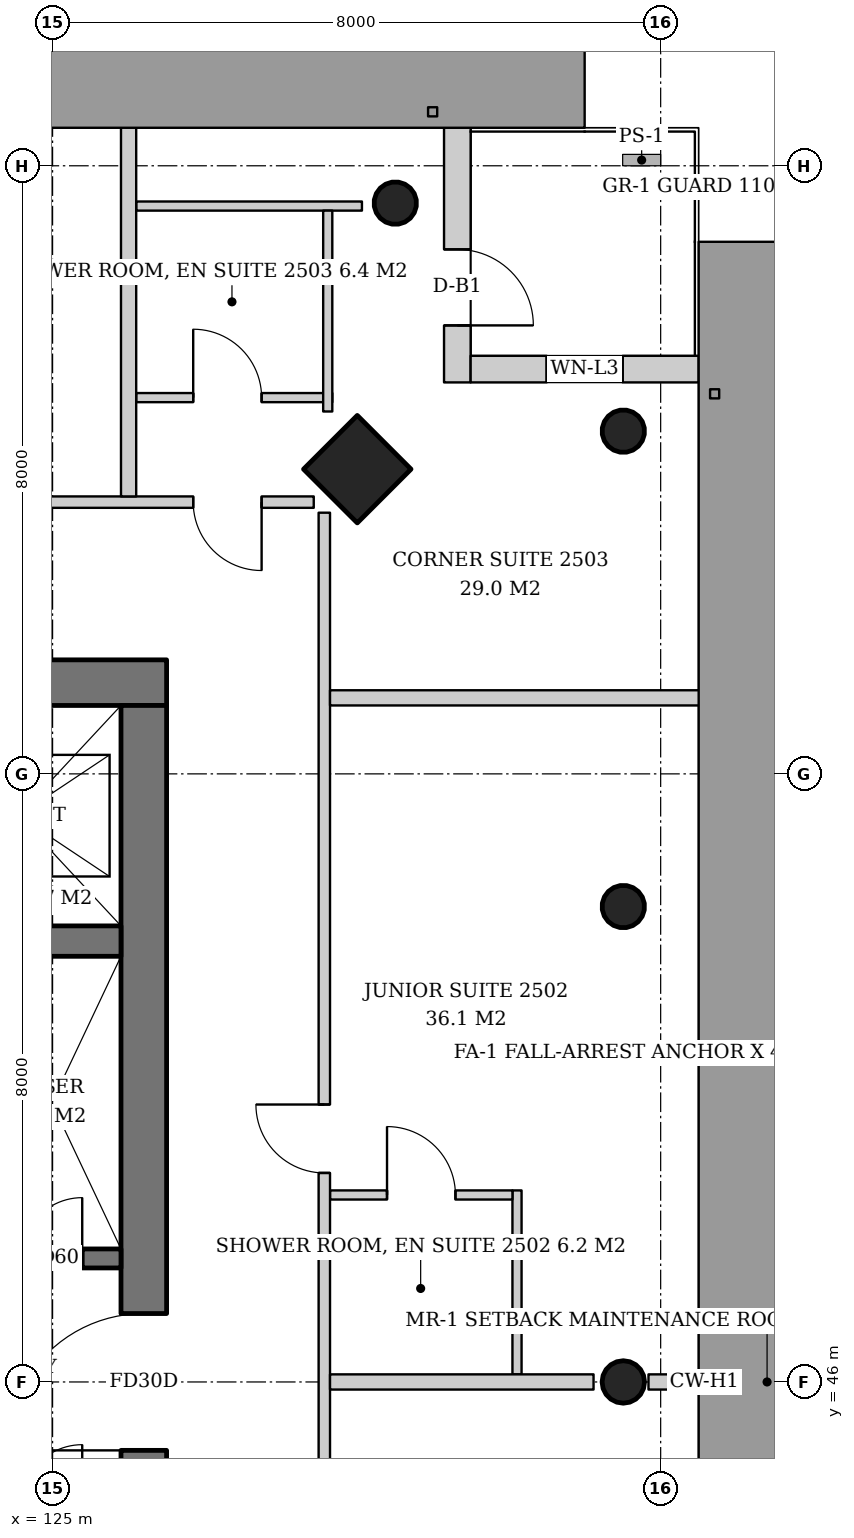
"""IFC4 building model, lengths in metres.
Left out: names, types, materials, properties, quantities, classifications, styles, units other than length and angle.
Written with IfcOpenShell. Run it as: python <this file> out.ifc"""

import sys

from ifc_helpers import new_model, si_unit, direction, frame, frame_2d, origin, origin_2d, place, context, subcontext, project, spatial, rectangle, hollow_circle, extrude, element, fill, save


model = new_model("IFC4")
c1 = context("Model", 3, precision=1e-05, world=origin(), true_north=direction((0.0, 1.0)))
c2 = subcontext(c1, "Body", "Model", "MODEL_VIEW")
j1 = project(units=[si_unit("LENGTHUNIT", "METRE"), si_unit("PLANEANGLEUNIT", "RADIAN")], contexts=[c1])
p1 = place(None, origin())
s1 = spatial("IfcSite", under=j1, at=p1, CompositionType="ELEMENT")
p2 = place(p1, origin())
s2 = spatial("IfcBuilding", under=s1, at=p2, CompositionType="ELEMENT")
p3 = place(p2, frame((0.0, 0.0, 100.8)))
s3 = spatial("IfcBuildingStorey", under=s2, at=p3, CompositionType="ELEMENT", Elevation=100.8)
p4 = place(p3, frame((129.06, 58.06, 0.0), z_axis=(-0.043029647111, -0.043029647111, 0.998146732169), x_axis=(0.707106781187, -0.707106781187, 0.0)))
e1 = element("IfcColumn", 1, at=p4, inside=s3, PredefinedType="COLUMN", context=c2, shape_type="SweptSolid", body=[
    extrude(rectangle(XDim=1.0, YDim=1.0, at=origin_2d()), origin(), (0.0, 0.0, 1.0), 3.807),
])
p5 = place(p3, frame((132.56, 58.56, 0.0), z_axis=(-0.043029647111, -0.043029647111, 0.998146732169), x_axis=(0.707106781187, -0.707106781187, 0.0)))
e2 = element("IfcColumn", 2, at=p5, inside=s3, PredefinedType="COLUMN", context=c2, shape_type="SweptSolid", body=[
    extrude(hollow_circle(Radius=0.28, WallThickness=0.02, at=origin_2d()), origin(), (0.0, 0.0, 1.0), 3.807),
])
p6 = place(p3, frame((132.56, 46.0, 0.0), z_axis=(-0.043069538298, 0.0, 0.999072076915), x_axis=(0.0, -1.0, 0.0)))
e3 = element("IfcColumn", 3, at=p6, inside=s3, PredefinedType="COLUMN", context=c2, shape_type="SweptSolid", body=[
    extrude(hollow_circle(Radius=0.28, WallThickness=0.02, at=origin_2d()), origin(), (0.0, 0.0, 1.0), 3.803),
])
p7 = place(p3, frame((132.56, 52.28, 0.0), z_axis=(-0.043059525333, -0.021561848751, 0.998839808957), x_axis=(0.44774654769, -0.894160516368, 0.0)))
e4 = element("IfcColumn", 4, at=p7, inside=s3, PredefinedType="COLUMN", context=c2, shape_type="SweptSolid", body=[
    extrude(hollow_circle(Radius=0.28, WallThickness=0.02, at=origin_2d()), origin(), (0.0, 0.0, 1.0), 3.804),
])
p8 = place(p3, frame((129.56, 61.56, 0.0), z_axis=(-0.043029647111, -0.043029647111, 0.998146732169), x_axis=(0.707106781187, -0.707106781187, 0.0)))
e5 = element("IfcColumn", 5, at=p8, inside=s3, PredefinedType="COLUMN", context=c2, shape_type="SweptSolid", body=[
    extrude(hollow_circle(Radius=0.28, WallThickness=0.02, at=origin_2d()), origin(), (0.0, 0.0, 1.0), 3.807),
])
p9 = place(p3, frame((107.5, 55.2, 0.0), z_axis=(0.0, 0.0, 1.0), x_axis=(1.0, 0.0, 0.0)))
e6 = element("IfcWall", 6, at=p9, inside=s3, PredefinedType="SHEAR", context=c2, shape_type="SweptSolid", body=[
    extrude(rectangle(XDim=19.0, YDim=0.6, at=frame_2d((9.5, 0.0))), origin(), (0.0, 0.0, 1.0), 3.8),
])
p10 = place(p9, frame((14.14, 0.0, 0.0)))
e7 = element("IfcOpeningElement", 7, at=p10, cuts=e6, PredefinedType="OPENING", context=c2, shape_type="SweptSolid", body=[
    extrude(rectangle(XDim=1.0, YDim=2.1, at=frame_2d((0.5, 1.05))), frame((0.0, 0.31, 0.0), z_axis=(0.0, -1.0, 0.0), x_axis=(1.0, 0.0, 0.0)), (0.0, 0.0, 1.0), 0.62),
])
p11 = place(p9, frame((1.675, 0.0, 0.0)))
e8 = element("IfcOpeningElement", 8, at=p11, cuts=e6, PredefinedType="OPENING", context=c2, shape_type="SweptSolid", body=[
    extrude(rectangle(XDim=1.0, YDim=2.1, at=frame_2d((0.5, 1.05))), frame((0.0, 0.31, 0.0), z_axis=(0.0, -1.0, 0.0), x_axis=(1.0, 0.0, 0.0)), (0.0, 0.0, 1.0), 0.62),
])
p12 = place(p9, frame((3.587, 0.0, 0.0)))
e9 = element("IfcOpeningElement", 9, at=p12, cuts=e6, PredefinedType="OPENING", context=c2, shape_type="SweptSolid", body=[
    extrude(rectangle(XDim=1.0, YDim=2.1, at=frame_2d((0.5, 1.05))), frame((0.0, 0.31, 0.0), z_axis=(0.0, -1.0, 0.0), x_axis=(1.0, 0.0, 0.0)), (0.0, 0.0, 1.0), 0.62),
])
p13 = place(p3, frame((126.2, 37.1, 0.0), z_axis=(0.0, 0.0, 1.0), x_axis=(0.0, 1.0, 0.0)))
e10 = element("IfcWall", 10, at=p13, inside=s3, PredefinedType="SHEAR", context=c2, shape_type="SweptSolid", body=[
    extrude(rectangle(XDim=17.8, YDim=0.6, at=frame_2d((8.9, 0.0))), origin(), (0.0, 0.0, 1.0), 3.8),
])
p14 = place(p13, frame((8.0, 0.0, 0.0)))
e11 = element("IfcOpeningElement", 11, at=p14, cuts=e10, PredefinedType="OPENING", context=c2, shape_type="SweptSolid", body=[
    extrude(rectangle(XDim=1.8, YDim=2.4, at=frame_2d((0.9, 1.2))), frame((0.0, 0.31, 0.0), z_axis=(0.0, -1.0, 0.0), x_axis=(1.0, 0.0, 0.0)), (0.0, 0.0, 1.0), 0.62),
])
p15 = place(p3, frame((108.1, 51.8, 0.0), z_axis=(0.0, 0.0, 1.0), x_axis=(1.0, 0.0, 0.0)))
e12 = element("IfcWall", 12, at=p15, inside=s3, PredefinedType="SHEAR", context=c2, shape_type="SweptSolid", body=[
    extrude(rectangle(XDim=17.8, YDim=0.4, at=frame_2d((8.9, 0.0))), origin(), (0.0, 0.0, 1.0), 3.8),
])
p16 = place(p3, frame((130.325, 62.5, 0.0), z_axis=(0.0, 0.0, 1.0), x_axis=(0.0, -1.0, 0.0)))
e13 = element("IfcWall", 13, at=p16, inside=s3, PredefinedType="SOLIDWALL", context=c2, shape_type="SweptSolid", body=[
    extrude(rectangle(XDim=3.35, YDim=0.35, at=frame_2d((1.675, 0.0))), origin(), (0.0, 0.0, 1.0), 3.6),
])
p17 = place(p16, frame((1.6, 0.0, 0.0)))
e14 = element("IfcOpeningElement", 14, at=p17, cuts=e13, PredefinedType="OPENING", context=c2, shape_type="SweptSolid", body=[
    extrude(rectangle(XDim=1.0, YDim=2.4, at=frame_2d((0.5, 1.2))), frame((0.0, 0.185, 0.0), z_axis=(0.0, -1.0, 0.0), x_axis=(1.0, 0.0, 0.0)), (0.0, 0.0, 1.0), 0.37),
])
p18 = place(p3, frame((130.5, 59.325, 0.0), z_axis=(0.0, 0.0, 1.0), x_axis=(1.0, 0.0, 0.0)))
e15 = element("IfcWall", 15, at=p18, inside=s3, PredefinedType="SOLIDWALL", context=c2, shape_type="SweptSolid", body=[
    extrude(rectangle(XDim=3.0, YDim=0.35, at=frame_2d((1.5, 0.0))), origin(), (0.0, 0.0, 1.0), 3.6),
])
p19 = place(p18, frame((1.0, 0.0, 0.9)))
e16 = element("IfcOpeningElement", 16, at=p19, cuts=e15, PredefinedType="OPENING", context=c2, shape_type="SweptSolid", body=[
    extrude(rectangle(XDim=1.0, YDim=2.4, at=frame_2d((0.5, 1.2))), frame((0.0, 0.185, 0.0), z_axis=(0.0, -1.0, 0.0), x_axis=(1.0, 0.0, 0.0)), (0.0, 0.0, 1.0), 0.37),
])
p20 = place(p3, frame((121.33, 47.625, 0.0), z_axis=(0.0, 0.0, 1.0), x_axis=(1.0, 0.0, 0.0)))
e17 = element("IfcWall", 17, at=p20, inside=s3, PredefinedType="SHEAR", context=c2, shape_type="SweptSolid", body=[
    extrude(rectangle(XDim=4.57, YDim=0.25, at=frame_2d((2.285, 0.0))), origin(), (0.0, 0.0, 1.0), 3.8),
])
p21 = place(p20, frame((0.55, 0.0, 0.0)))
e18 = element("IfcOpeningElement", 18, at=p21, cuts=e17, PredefinedType="OPENING", context=c2, shape_type="SweptSolid", body=[
    extrude(rectangle(XDim=1.4, YDim=2.4, at=frame_2d((0.7, 1.2))), frame((0.0, 0.135, 0.0), z_axis=(0.0, -1.0, 0.0), x_axis=(1.0, 0.0, 0.0)), (0.0, 0.0, 1.0), 0.27),
])
p22 = place(p20, frame((3.26, 0.0, 0.0)))
e19 = element("IfcOpeningElement", 19, at=p22, cuts=e17, PredefinedType="OPENING", context=c2, shape_type="SweptSolid", body=[
    extrude(rectangle(XDim=0.8, YDim=2.0, at=frame_2d((0.4, 1.0))), frame((0.0, 0.135, 0.0), z_axis=(0.0, -1.0, 0.0), x_axis=(1.0, 0.0, 0.0)), (0.0, 0.0, 1.0), 0.27),
])
p23 = place(p3, frame((131.11, 46.1, 0.0), z_axis=(0.0, 0.0, 1.0), x_axis=(0.0, 1.0, 0.0)))
e20 = element("IfcWall", 20, at=p23, inside=s3, PredefinedType="PARTITIONING", context=c2, shape_type="SweptSolid", body=[
    extrude(rectangle(XDim=2.42, YDim=0.12, at=frame_2d((1.21, 0.0))), origin(), (0.0, 0.0, 1.0), 3.6),
])
p24 = place(p3, frame((128.65, 48.46, 0.0), z_axis=(0.0, 0.0, 1.0), x_axis=(1.0, 0.0, 0.0)))
e21 = element("IfcWall", 21, at=p24, inside=s3, PredefinedType="PARTITIONING", context=c2, shape_type="SweptSolid", body=[
    extrude(rectangle(XDim=2.4, YDim=0.12, at=frame_2d((1.2, 0.0))), origin(), (0.0, 0.0, 1.0), 3.6),
])
p25 = place(p24, frame((0.75, 0.0, 0.0)))
e22 = element("IfcOpeningElement", 22, at=p25, cuts=e21, PredefinedType="OPENING", context=c2, shape_type="SweptSolid", body=[
    extrude(rectangle(XDim=0.9, YDim=2.1, at=frame_2d((0.45, 1.05))), frame((0.0, 0.07, 0.0), z_axis=(0.0, -1.0, 0.0), x_axis=(1.0, 0.0, 0.0)), (0.0, 0.0, 1.0), 0.14),
])
p26 = place(p3, frame((128.575, 34.564, 0.0), z_axis=(0.0, 0.0, 1.0), x_axis=(0.0, 1.0, 0.0)))
e23 = element("IfcWall", 23, at=p26, inside=s3, PredefinedType="PARTITIONING", context=c2, shape_type="SweptSolid", body=[
    extrude(rectangle(XDim=22.872, YDim=0.15, at=frame_2d((11.436, 0.0))), origin(), (0.0, 0.0, 1.0), 2.9),
])
p27 = place(p26, frame((0.636, 0.0, 0.0)))
e24 = element("IfcOpeningElement", 24, at=p27, cuts=e23, PredefinedType="OPENING", context=c2, shape_type="SweptSolid", body=[
    extrude(rectangle(XDim=1.0, YDim=2.1, at=frame_2d((0.5, 1.05))), frame((0.0, 0.085, 0.0), z_axis=(0.0, -1.0, 0.0), x_axis=(1.0, 0.0, 0.0)), (0.0, 0.0, 1.0), 0.17),
])
p28 = place(p26, frame((5.186, 0.0, 0.0)))
e25 = element("IfcOpeningElement", 25, at=p28, cuts=e23, PredefinedType="OPENING", context=c2, shape_type="SweptSolid", body=[
    extrude(rectangle(XDim=0.9, YDim=2.1, at=frame_2d((0.45, 1.05))), frame((0.0, 0.085, 0.0), z_axis=(0.0, -1.0, 0.0), x_axis=(1.0, 0.0, 0.0)), (0.0, 0.0, 1.0), 0.17),
])
p29 = place(p26, frame((14.186, 0.0, 0.0)))
e26 = element("IfcOpeningElement", 26, at=p29, cuts=e23, PredefinedType="OPENING", context=c2, shape_type="SweptSolid", body=[
    extrude(rectangle(XDim=0.9, YDim=2.1, at=frame_2d((0.45, 1.05))), frame((0.0, 0.085, 0.0), z_axis=(0.0, -1.0, 0.0), x_axis=(1.0, 0.0, 0.0)), (0.0, 0.0, 1.0), 0.17),
])
p30 = place(p3, frame((128.65, 46.0, 0.0), z_axis=(0.0, 0.0, 1.0), x_axis=(1.0, 0.0, 0.0)))
e27 = element("IfcWall", 27, at=p30, inside=s3, PredefinedType="PARTITIONING", context=c2, shape_type="SweptSolid", body=[
    extrude(rectangle(XDim=3.467, YDim=0.2, at=frame_2d((1.733, 0.0))), origin(), (0.0, 0.0, 1.0), 3.6),
])
p31 = place(p3, frame((132.84, 46.0, 0.0), z_axis=(0.0, 0.0, 1.0), x_axis=(1.0, 0.0, 0.0)))
e28 = element("IfcWall", 28, at=p31, inside=s3, PredefinedType="PARTITIONING", context=c2, shape_type="SweptSolid", body=[
    extrude(rectangle(XDim=0.7, YDim=0.2, at=frame_2d((0.35, 0.0))), origin(), (0.0, 0.0, 1.0), 3.6),
])
p32 = place(p3, frame((128.65, 55.0, 0.0), z_axis=(0.0, 0.0, 1.0), x_axis=(1.0, 0.0, 0.0)))
e29 = element("IfcWall", 29, at=p32, inside=s3, PredefinedType="PARTITIONING", context=c2, shape_type="SweptSolid", body=[
    extrude(rectangle(XDim=4.89, YDim=0.2, at=frame_2d((2.445, 0.0))), origin(), (0.0, 0.0, 1.0), 3.2),
])
p33 = place(p3, frame((126.1, 58.95, 0.0), z_axis=(0.0, 0.0, 1.0), x_axis=(1.0, 0.0, 0.0)))
e30 = element("IfcWall", 30, at=p33, inside=s3, PredefinedType="PARTITIONING", context=c2, shape_type="SweptSolid", body=[
    extrude(rectangle(XDim=2.58, YDim=0.12, at=frame_2d((1.29, 0.0))), origin(), (0.0, 0.0, 1.0), 2.9),
])
p34 = place(p33, frame((0.75, 0.0, 0.0)))
e31 = element("IfcOpeningElement", 31, at=p34, cuts=e30, PredefinedType="OPENING", context=c2, shape_type="SweptSolid", body=[
    extrude(rectangle(XDim=0.9, YDim=2.1, at=frame_2d((0.45, 1.05))), frame((0.0, 0.07, 0.0), z_axis=(0.0, -1.0, 0.0), x_axis=(1.0, 0.0, 0.0)), (0.0, 0.0, 1.0), 0.14),
])
p35 = place(p3, frame((126.1, 61.47, 0.0), z_axis=(0.0, 0.0, 1.0), x_axis=(1.0, 0.0, 0.0)))
e32 = element("IfcWall", 32, at=p35, inside=s3, PredefinedType="PARTITIONING", context=c2, shape_type="SweptSolid", body=[
    extrude(rectangle(XDim=2.97, YDim=0.12, at=frame_2d((1.485, 0.0))), origin(), (0.0, 0.0, 1.0), 3.2),
])
p36 = place(p3, frame((128.62, 58.767, 0.0), z_axis=(0.0, 0.0, 1.0), x_axis=(0.0, 1.0, 0.0)))
e33 = element("IfcWall", 33, at=p36, inside=s3, PredefinedType="PARTITIONING", context=c2, shape_type="SweptSolid", body=[
    extrude(rectangle(XDim=2.643, YDim=0.12, at=frame_2d((1.321, 0.0))), origin(), (0.0, 0.0, 1.0), 3.2),
])
p37 = place(p3, frame((128.436, 57.575, 0.0), z_axis=(0.0, 0.0, 1.0), x_axis=(-1.0, 0.0, 0.0)))
e34 = element("IfcWall", 34, at=p37, inside=s3, PredefinedType="PARTITIONING", context=c2, shape_type="SweptSolid", body=[
    extrude(rectangle(XDim=22.872, YDim=0.15, at=frame_2d((11.436, 0.0))), origin(), (0.0, 0.0, 1.0), 2.9),
])
p38 = place(p37, frame((0.686, 0.0, 0.0)))
e35 = element("IfcOpeningElement", 35, at=p38, cuts=e34, PredefinedType="OPENING", context=c2, shape_type="SweptSolid", body=[
    extrude(rectangle(XDim=0.9, YDim=2.1, at=frame_2d((0.45, 1.05))), frame((0.0, 0.085, 0.0), z_axis=(0.0, -1.0, 0.0), x_axis=(1.0, 0.0, 0.0)), (0.0, 0.0, 1.0), 0.17),
])
p39 = place(p37, frame((5.136, 0.0, 0.0)))
e36 = element("IfcOpeningElement", 36, at=p39, cuts=e34, PredefinedType="OPENING", context=c2, shape_type="SweptSolid", body=[
    extrude(rectangle(XDim=1.0, YDim=2.1, at=frame_2d((0.5, 1.05))), frame((0.0, 0.085, 0.0), z_axis=(0.0, -1.0, 0.0), x_axis=(1.0, 0.0, 0.0)), (0.0, 0.0, 1.0), 0.17),
])
p40 = place(p37, frame((14.186, 0.0, 0.0)))
e37 = element("IfcOpeningElement", 37, at=p40, cuts=e34, PredefinedType="OPENING", context=c2, shape_type="SweptSolid", body=[
    extrude(rectangle(XDim=0.9, YDim=2.1, at=frame_2d((0.45, 1.05))), frame((0.0, 0.085, 0.0), z_axis=(0.0, -1.0, 0.0), x_axis=(1.0, 0.0, 0.0)), (0.0, 0.0, 1.0), 0.17),
])
p41 = place(p3, frame((126.0, 57.65, 0.0), z_axis=(0.0, 0.0, 1.0), x_axis=(0.0, 1.0, 0.0)))
e38 = element("IfcWall", 38, at=p41, inside=s3, PredefinedType="PARTITIONING", context=c2, shape_type="SweptSolid", body=[
    extrude(rectangle(XDim=4.89, YDim=0.2, at=frame_2d((2.445, 0.0))), origin(), (0.0, 0.0, 1.0), 2.9),
])
p42 = place(p17, origin())
e39 = element("IfcDoor", 39, at=p42, inside=s3, OperationType="SINGLE_SWING_RIGHT", PredefinedType="DOOR", context=c2, shape_type="SweptSolid", body=[
    extrude(rectangle(XDim=1.0, YDim=2.4, at=frame_2d((0.5, 1.2))), frame((0.0, 0.025, 0.0), z_axis=(0.0, -1.0, 0.0), x_axis=(1.0, 0.0, 0.0)), (0.0, 0.0, 1.0), 0.05),
])
fill(e14, e39)
p43 = place(p19, origin())
e40 = element("IfcWindow", 40, at=p43, inside=s3, PartitioningType="SINGLE_PANEL", PredefinedType="WINDOW", context=c2, shape_type="SweptSolid", body=[
    extrude(rectangle(XDim=1.0, YDim=2.4, at=frame_2d((0.5, 1.2))), frame((0.0, 0.03, 0.0), z_axis=(0.0, -1.0, 0.0), x_axis=(1.0, 0.0, 0.0)), (0.0, 0.0, 1.0), 0.06),
])
fill(e16, e40)
p44 = place(p22, origin())
e41 = element("IfcDoor", 41, at=p44, inside=s3, OperationType="SINGLE_SWING_RIGHT", PredefinedType="DOOR", context=c2, shape_type="SweptSolid", body=[
    extrude(rectangle(XDim=0.8, YDim=2.0, at=frame_2d((0.4, 1.0))), frame((0.0, 0.025, 0.0), z_axis=(0.0, -1.0, 0.0), x_axis=(1.0, 0.0, 0.0)), (0.0, 0.0, 1.0), 0.05),
])
fill(e19, e41)
p45 = place(p14, origin())
e42 = element("IfcDoor", 42, at=p45, inside=s3, OperationType="DOUBLE_DOOR_SINGLE_SWING", PredefinedType="DOOR", context=c2, shape_type="SweptSolid", body=[
    extrude(rectangle(XDim=1.8, YDim=2.4, at=frame_2d((0.9, 1.2))), frame((0.0, 0.025, 0.0), z_axis=(0.0, -1.0, 0.0), x_axis=(1.0, 0.0, 0.0)), (0.0, 0.0, 1.0), 0.05),
])
fill(e11, e42)
p46 = place(p25, origin())
e43 = element("IfcDoor", 43, at=p46, inside=s3, OperationType="SINGLE_SWING_LEFT", PredefinedType="DOOR", context=c2, shape_type="SweptSolid", body=[
    extrude(rectangle(XDim=0.9, YDim=2.1, at=frame_2d((0.45, 1.05))), frame((0.0, 0.025, 0.0), z_axis=(0.0, -1.0, 0.0), x_axis=(1.0, 0.0, 0.0)), (0.0, 0.0, 1.0), 0.05),
])
fill(e22, e43)
p47 = place(p29, origin())
e44 = element("IfcDoor", 44, at=p47, inside=s3, OperationType="SINGLE_SWING_RIGHT", PredefinedType="DOOR", context=c2, shape_type="SweptSolid", body=[
    extrude(rectangle(XDim=0.9, YDim=2.1, at=frame_2d((0.45, 1.05))), frame((0.0, 0.025, 0.0), z_axis=(0.0, -1.0, 0.0), x_axis=(1.0, 0.0, 0.0)), (0.0, 0.0, 1.0), 0.05),
])
fill(e26, e44)
p48 = place(p34, origin())
e45 = element("IfcDoor", 45, at=p48, inside=s3, OperationType="SINGLE_SWING_LEFT", PredefinedType="DOOR", context=c2, shape_type="SweptSolid", body=[
    extrude(rectangle(XDim=0.9, YDim=2.1, at=frame_2d((0.45, 1.05))), frame((0.0, 0.025, 0.0), z_axis=(0.0, -1.0, 0.0), x_axis=(1.0, 0.0, 0.0)), (0.0, 0.0, 1.0), 0.05),
])
fill(e31, e45)
p49 = place(p38, origin())
e46 = element("IfcDoor", 46, at=p49, inside=s3, OperationType="SINGLE_SWING_LEFT", PredefinedType="DOOR", context=c2, shape_type="SweptSolid", body=[
    extrude(rectangle(XDim=0.9, YDim=2.1, at=frame_2d((0.45, 1.05))), frame((0.0, 0.025, 0.0), z_axis=(0.0, -1.0, 0.0), x_axis=(1.0, 0.0, 0.0)), (0.0, 0.0, 1.0), 0.05),
])
fill(e35, e46)
save(model, sys.argv[1])
